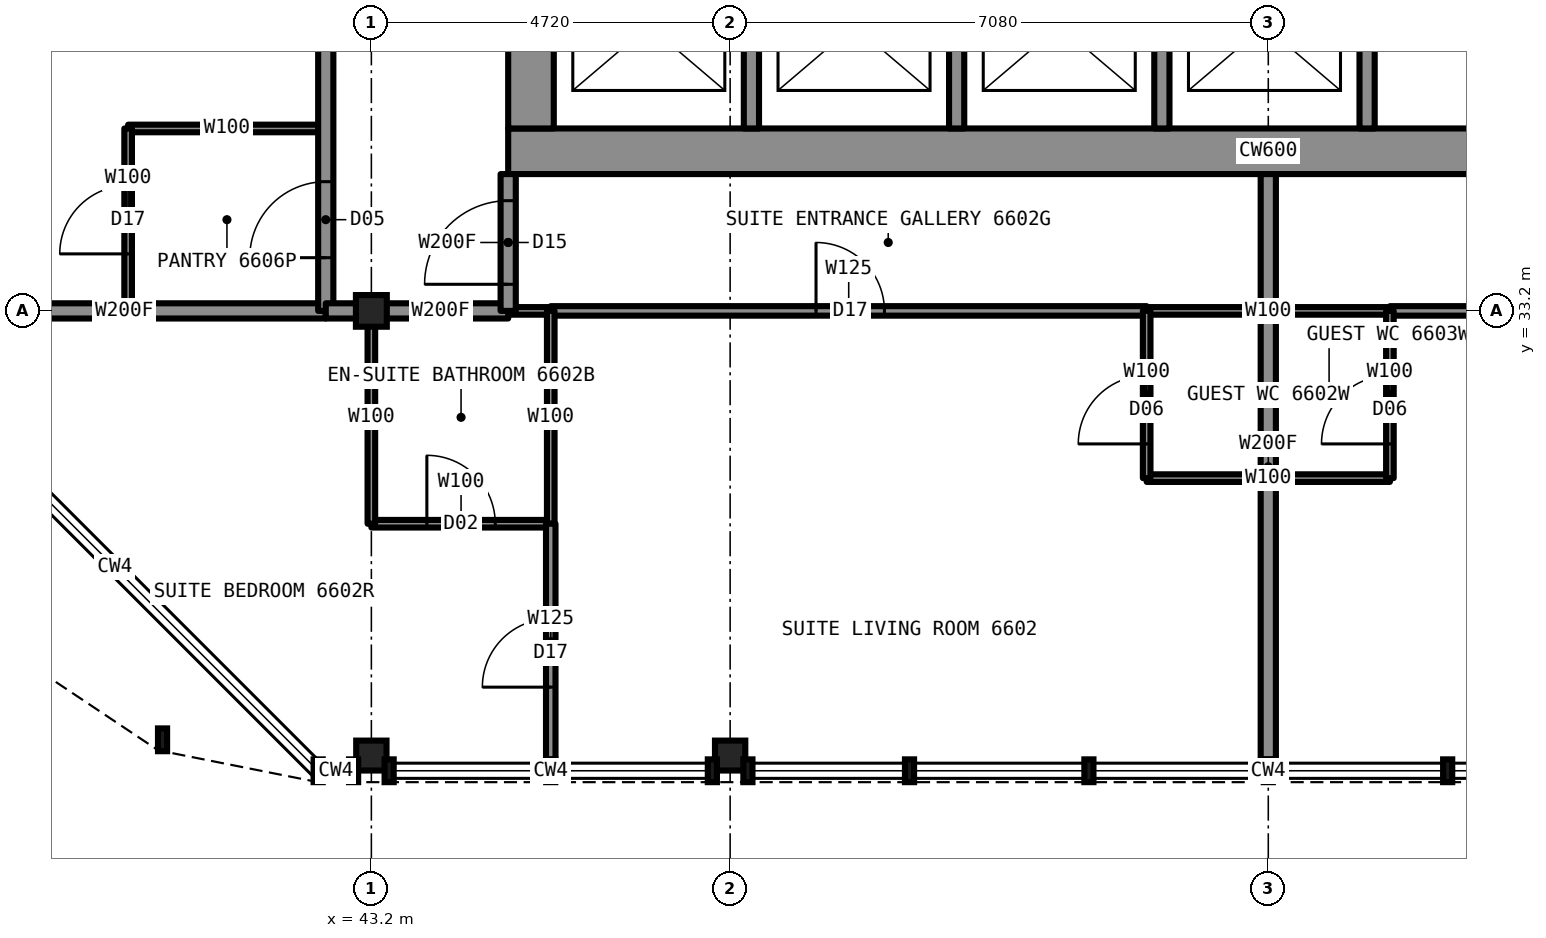
"""IFC4 building model, lengths in metres.
Left out: names, types, materials, properties, quantities, classifications, styles, units other than length and angle.
Written with IfcOpenShell. Run it as: python <this file> out.ifc"""

import sys

from ifc_helpers import new_model, si_unit, direction, frame, frame_2d, origin, origin_2d, place, context, subcontext, project, spatial, rectangle, i_section, extrude, element, fill, save


model = new_model("IFC4")
c1 = context("Model", 3, precision=1e-05, world=origin(), true_north=direction((0.0, 1.0)))
c2 = subcontext(c1, "Body", "Model", "MODEL_VIEW")
j1 = project(units=[si_unit("LENGTHUNIT", "METRE"), si_unit("PLANEANGLEUNIT", "RADIAN")], contexts=[c1])
p1 = place(None, origin())
s1 = spatial("IfcSite", under=j1, at=p1, CompositionType="ELEMENT")
p2 = place(p1, origin())
s2 = spatial("IfcBuilding", under=s1, at=p2, CompositionType="ELEMENT")
p3 = place(p2, frame((0.0, 0.0, 237.2)))
s3 = spatial("IfcBuildingStorey", under=s2, at=p3, CompositionType="ELEMENT", Elevation=237.2)
for number, where, z_axis, x_axis in (
    (1, (43.2, 27.35, 0.0), (0.0, 0.0, 1.0), (1.0, 0.0, 0.0)),
    (2, (47.92, 27.35, 0.0), (0.0, 0.0, 1.0), (1.0, 0.0, 0.0)),
):
    element("IfcColumn", number, at=place(p3, frame(where, z_axis=z_axis, x_axis=x_axis)), inside=s3, PredefinedType="COLUMN", context=c2, shape_type="SweptSolid", body=[
        extrude(i_section(OverallWidth=0.399, OverallDepth=0.394, WebThickness=0.023, FlangeThickness=0.037, at=origin_2d()), origin(), (0.0, 0.0, 1.0), 3.5),
    ])
p4 = place(p3, frame((43.2, 33.2, 0.0), z_axis=(0.0, 0.0, 1.0), x_axis=(1.0, 0.0, 0.0)))
e3 = element("IfcColumn", 3, at=p4, inside=s3, PredefinedType="COLUMN", context=c2, shape_type="SweptSolid", body=[
    extrude(i_section(OverallWidth=0.406, OverallDepth=0.417, WebThickness=0.03, FlangeThickness=0.048, at=origin_2d()), origin(), (0.0, 0.0, 1.0), 3.5),
])
p5 = place(p3, frame((45.0, 35.3, 0.0), z_axis=(0.0, 0.0, 1.0), x_axis=(1.0, 0.0, 0.0)))
e4 = element("IfcWall", 4, at=p5, inside=s3, PredefinedType="SHEAR", context=c2, shape_type="SweptSolid", body=[
    extrude(rectangle(XDim=20.0, YDim=0.6, at=frame_2d((10.0, 0.0))), origin(), (0.0, 0.0, 1.0), 3.5),
])
p6 = place(p3, frame((45.3, 35.6, 0.0), z_axis=(0.0, 0.0, 1.0), x_axis=(0.0, 1.0, 0.0)))
e5 = element("IfcWall", 5, at=p6, inside=s3, PredefinedType="SHEAR", context=c2, shape_type="SweptSolid", body=[
    extrude(rectangle(XDim=18.8, YDim=0.6, at=frame_2d((9.4, 0.0))), origin(), (0.0, 0.0, 1.0), 3.5),
])
p7 = place(p6, frame((13.4, 0.0, 0.0)))
e6 = element("IfcOpeningElement", 6, at=p7, cuts=e5, PredefinedType="OPENING", context=c2, shape_type="SweptSolid", body=[
    extrude(rectangle(XDim=1.8, YDim=2.2, at=frame_2d((0.9, 1.1))), frame((0.0, 0.31, 0.0), z_axis=(0.0, -1.0, 0.0), x_axis=(1.0, 0.0, 0.0)), (0.0, 0.0, 1.0), 0.62),
])
p8 = place(p6, frame((3.6, 0.0, 0.0)))
e7 = element("IfcOpeningElement", 7, at=p8, cuts=e5, PredefinedType="OPENING", context=c2, shape_type="SweptSolid", body=[
    extrude(rectangle(XDim=1.8, YDim=2.2, at=frame_2d((0.9, 1.1))), frame((0.0, 0.31, 0.0), z_axis=(0.0, -1.0, 0.0), x_axis=(1.0, 0.0, 0.0)), (0.0, 0.0, 1.0), 0.62),
])
p9 = place(p6, frame((6.4, 0.0, 0.0)))
e8 = element("IfcOpeningElement", 8, at=p9, cuts=e5, PredefinedType="OPENING", context=c2, shape_type="SweptSolid", body=[
    extrude(rectangle(XDim=1.2, YDim=2.2, at=frame_2d((0.6, 1.1))), frame((0.0, 0.31, 0.0), z_axis=(0.0, -1.0, 0.0), x_axis=(1.0, 0.0, 0.0)), (0.0, 0.0, 1.0), 0.62),
])
p10 = place(p3, frame((45.0, 33.2, 0.0), z_axis=(0.0, 0.0, 1.0), x_axis=(1.0, 0.0, 0.0)))
e9 = element("IfcWall", 9, at=p10, inside=s3, PredefinedType="PARTITIONING", context=c2, shape_type="SweptSolid", body=[
    extrude(rectangle(XDim=0.56, YDim=0.1, at=frame_2d((0.28, 0.0))), origin(), (0.0, 0.0, 1.0), 3.33),
])
p11 = place(p3, frame((53.4, 33.2, 0.0), z_axis=(0.0, 0.0, 1.0), x_axis=(1.0, 0.0, 0.0)))
e10 = element("IfcWall", 10, at=p11, inside=s3, PredefinedType="PARTITIONING", context=c2, shape_type="SweptSolid", body=[
    extrude(rectangle(XDim=3.2, YDim=0.1, at=frame_2d((1.6, 0.0))), origin(), (0.0, 0.0, 1.0), 3.33),
])
p12 = place(p3, frame((43.22, 33.2, 0.0), z_axis=(0.0, 0.0, 1.0), x_axis=(1.0, 0.0, 0.0)))
e11 = element("IfcWall", 11, at=p12, inside=s3, PredefinedType="PARTITIONING", context=c2, shape_type="SweptSolid", body=[
    extrude(rectangle(XDim=1.78, YDim=0.2, at=frame_2d((0.89, 0.0))), origin(), (0.0, 0.0, 1.0), 3.33),
])
p13 = place(p3, frame((37.3, 33.2, 0.0), z_axis=(0.0, 0.0, 1.0), x_axis=(1.0, 0.0, 0.0)))
e12 = element("IfcWall", 12, at=p13, inside=s3, PredefinedType="PARTITIONING", context=c2, shape_type="SweptSolid", body=[
    extrude(rectangle(XDim=5.3, YDim=0.2, at=frame_2d((2.65, 0.0))), origin(), (0.0, 0.0, 1.0), 2.573),
])
p14 = place(p3, frame((45.56, 33.2, 0.0), z_axis=(0.0, 0.0, 1.0), x_axis=(1.0, 0.0, 0.0)))
e13 = element("IfcWall", 13, at=p14, inside=s3, PredefinedType="PARTITIONING", context=c2, shape_type="SweptSolid", body=[
    extrude(rectangle(XDim=7.84, YDim=0.125, at=frame_2d((3.92, 0.0))), origin(), (0.0, 0.0, 1.0), 3.33),
])
p15 = place(p14, frame((3.49, 0.0, 0.0)))
e14 = element("IfcOpeningElement", 14, at=p15, cuts=e13, PredefinedType="OPENING", context=c2, shape_type="SweptSolid", body=[
    extrude(rectangle(XDim=0.9, YDim=2.2, at=frame_2d((0.45, 1.1))), frame((0.0, 0.073, 0.0), z_axis=(0.0, -1.0, 0.0), x_axis=(1.0, 0.0, 0.0)), (0.0, 0.0, 1.0), 0.145),
])
p16 = place(p3, frame((56.6, 33.2, 0.0), z_axis=(0.0, 0.0, 1.0), x_axis=(1.0, 0.0, 0.0)))
e15 = element("IfcWall", 15, at=p16, inside=s3, PredefinedType="PARTITIONING", context=c2, shape_type="SweptSolid", body=[
    extrude(rectangle(XDim=7.84, YDim=0.125, at=frame_2d((3.92, 0.0))), origin(), (0.0, 0.0, 1.0), 3.33),
])
p17 = place(p16, frame((3.45, 0.0, 0.0)))
e16 = element("IfcOpeningElement", 16, at=p17, cuts=e15, PredefinedType="OPENING", context=c2, shape_type="SweptSolid", body=[
    extrude(rectangle(XDim=0.9, YDim=2.2, at=frame_2d((0.45, 1.1))), frame((0.0, 0.073, 0.0), z_axis=(0.0, -1.0, 0.0), x_axis=(1.0, 0.0, 0.0)), (0.0, 0.0, 1.0), 0.145),
])
p18 = place(p3, frame((53.4, 31.0, 0.0), z_axis=(0.0, 0.0, 1.0), x_axis=(1.0, 0.0, 0.0)))
e17 = element("IfcWall", 17, at=p18, inside=s3, PredefinedType="PARTITIONING", context=c2, shape_type="SweptSolid", body=[
    extrude(rectangle(XDim=3.2, YDim=0.1, at=frame_2d((1.6, 0.0))), origin(), (0.0, 0.0, 1.0), 3.33),
])
p19 = place(p3, frame((43.2, 30.4, 0.0), z_axis=(0.0, 0.0, 1.0), x_axis=(1.0, 0.0, 0.0)))
e18 = element("IfcWall", 18, at=p19, inside=s3, PredefinedType="PARTITIONING", context=c2, shape_type="SweptSolid", body=[
    extrude(rectangle(XDim=2.36, YDim=0.1, at=frame_2d((1.18, 0.0))), origin(), (0.0, 0.0, 1.0), 3.33),
])
p20 = place(p19, frame((0.73, 0.0, 0.0)))
e19 = element("IfcOpeningElement", 19, at=p20, cuts=e18, PredefinedType="OPENING", context=c2, shape_type="SweptSolid", body=[
    extrude(rectangle(XDim=0.9, YDim=2.1, at=frame_2d((0.45, 1.05))), frame((0.0, 0.06, 0.0), z_axis=(0.0, -1.0, 0.0), x_axis=(1.0, 0.0, 0.0)), (0.0, 0.0, 1.0), 0.12),
])
p21 = place(p3, frame((40.0, 35.6, 0.0), z_axis=(0.0, 0.0, 1.0), x_axis=(1.0, 0.0, 0.0)))
e20 = element("IfcWall", 20, at=p21, inside=s3, PredefinedType="PARTITIONING", context=c2, shape_type="SweptSolid", body=[
    extrude(rectangle(XDim=2.6, YDim=0.1, at=frame_2d((1.3, 0.0))), origin(), (0.0, 0.0, 1.0), 2.797),
])
p22 = place(p3, frame((53.4, 31.0, 0.0), z_axis=(0.0, 0.0, 1.0), x_axis=(0.0, 1.0, 0.0)))
e21 = element("IfcWall", 21, at=p22, inside=s3, PredefinedType="PARTITIONING", context=c2, shape_type="SweptSolid", body=[
    extrude(rectangle(XDim=2.2, YDim=0.1, at=frame_2d((1.1, 0.0))), origin(), (0.0, 0.0, 1.0), 3.33),
])
p23 = place(p22, frame((0.45, 0.0, 0.0)))
e22 = element("IfcOpeningElement", 22, at=p23, cuts=e21, PredefinedType="OPENING", context=c2, shape_type="SweptSolid", body=[
    extrude(rectangle(XDim=0.9, YDim=2.1, at=frame_2d((0.45, 1.05))), frame((0.0, 0.06, 0.0), z_axis=(0.0, -1.0, 0.0), x_axis=(1.0, 0.0, 0.0)), (0.0, 0.0, 1.0), 0.12),
])
p24 = place(p3, frame((45.0, 33.2, 0.0), z_axis=(0.0, 0.0, 1.0), x_axis=(0.0, 1.0, 0.0)))
e23 = element("IfcWall", 23, at=p24, inside=s3, PredefinedType="PARTITIONING", context=c2, shape_type="SweptSolid", body=[
    extrude(rectangle(XDim=1.8, YDim=0.2, at=frame_2d((0.9, 0.0))), origin(), (0.0, 0.0, 1.0), 3.33),
])
p25 = place(p24, frame((0.35, 0.0, 0.0)))
e24 = element("IfcOpeningElement", 24, at=p25, cuts=e23, PredefinedType="OPENING", context=c2, shape_type="SweptSolid", body=[
    extrude(rectangle(XDim=1.1, YDim=2.2, at=frame_2d((0.55, 1.1))), frame((0.0, 0.11, 0.0), z_axis=(0.0, -1.0, 0.0), x_axis=(1.0, 0.0, 0.0)), (0.0, 0.0, 1.0), 0.22),
])
p26 = place(p3, frame((43.2, 30.4, 0.0), z_axis=(0.0, 0.0, 1.0), x_axis=(0.0, 1.0, 0.0)))
e25 = element("IfcWall", 25, at=p26, inside=s3, PredefinedType="PARTITIONING", context=c2, shape_type="SweptSolid", body=[
    extrude(rectangle(XDim=2.8, YDim=0.1, at=frame_2d((1.4, 0.0))), origin(), (0.0, 0.0, 1.0), 2.573),
])
p27 = place(p3, frame((42.6, 33.2, 0.0), z_axis=(0.0, 0.0, 1.0), x_axis=(0.0, 1.0, 0.0)))
e26 = element("IfcWall", 26, at=p27, inside=s3, PredefinedType="PARTITIONING", context=c2, shape_type="SweptSolid", body=[
    extrude(rectangle(XDim=23.6, YDim=0.2, at=frame_2d((11.8, 0.0))), origin(), (0.0, 0.0, 1.0), 3.33),
])
p28 = place(p27, frame((8.95, 0.0, 0.0)))
e27 = element("IfcOpeningElement", 27, at=p28, cuts=e26, PredefinedType="OPENING", context=c2, shape_type="SweptSolid", body=[
    extrude(rectangle(XDim=1.1, YDim=2.2, at=frame_2d((0.55, 1.1))), frame((0.0, 0.11, 0.0), z_axis=(0.0, -1.0, 0.0), x_axis=(1.0, 0.0, 0.0)), (0.0, 0.0, 1.0), 0.22),
])
p29 = place(p27, frame((0.7, 0.0, 0.0)))
e28 = element("IfcOpeningElement", 28, at=p29, cuts=e26, PredefinedType="OPENING", context=c2, shape_type="SweptSolid", body=[
    extrude(rectangle(XDim=1.0, YDim=2.1, at=frame_2d((0.5, 1.05))), frame((0.0, 0.11, 0.0), z_axis=(0.0, -1.0, 0.0), x_axis=(1.0, 0.0, 0.0)), (0.0, 0.0, 1.0), 0.22),
])
p30 = place(p3, frame((40.0, 33.2, 0.0), z_axis=(0.0, 0.0, 1.0), x_axis=(0.0, 1.0, 0.0)))
e29 = element("IfcWall", 29, at=p30, inside=s3, PredefinedType="PARTITIONING", context=c2, shape_type="SweptSolid", body=[
    extrude(rectangle(XDim=2.4, YDim=0.1, at=frame_2d((1.2, 0.0))), origin(), (0.0, 0.0, 1.0), 3.33),
])
p31 = place(p30, frame((0.75, 0.0, 0.0)))
e30 = element("IfcOpeningElement", 30, at=p31, cuts=e29, PredefinedType="OPENING", context=c2, shape_type="SweptSolid", body=[
    extrude(rectangle(XDim=0.9, YDim=2.2, at=frame_2d((0.45, 1.1))), frame((0.0, 0.06, 0.0), z_axis=(0.0, -1.0, 0.0), x_axis=(1.0, 0.0, 0.0)), (0.0, 0.0, 1.0), 0.12),
])
p32 = place(p3, frame((45.56, 30.4, 0.0), z_axis=(0.0, 0.0, 1.0), x_axis=(0.0, 1.0, 0.0)))
e31 = element("IfcWall", 31, at=p32, inside=s3, PredefinedType="PARTITIONING", context=c2, shape_type="SweptSolid", body=[
    extrude(rectangle(XDim=2.8, YDim=0.1, at=frame_2d((1.4, 0.0))), origin(), (0.0, 0.0, 1.0), 3.33),
])
p33 = place(p3, frame((45.56, 27.3, 0.0), z_axis=(0.0, 0.0, 1.0), x_axis=(0.0, 1.0, 0.0)))
e32 = element("IfcWall", 32, at=p33, inside=s3, PredefinedType="PARTITIONING", context=c2, shape_type="SweptSolid", body=[
    extrude(rectangle(XDim=3.1, YDim=0.125, at=frame_2d((1.55, 0.0))), origin(), (0.0, 0.0, 1.0), 3.33),
])
p34 = place(p33, frame((0.95, 0.0, 0.0)))
e33 = element("IfcOpeningElement", 33, at=p34, cuts=e32, PredefinedType="OPENING", context=c2, shape_type="SweptSolid", body=[
    extrude(rectangle(XDim=0.9, YDim=2.2, at=frame_2d((0.45, 1.1))), frame((0.0, 0.073, 0.0), z_axis=(0.0, -1.0, 0.0), x_axis=(1.0, 0.0, 0.0)), (0.0, 0.0, 1.0), 0.145),
])
p35 = place(p3, frame((55.0, 27.3, 0.0), z_axis=(0.0, 0.0, 1.0), x_axis=(0.0, 1.0, 0.0)))
e34 = element("IfcWall", 34, at=p35, inside=s3, PredefinedType="PARTITIONING", context=c2, shape_type="SweptSolid", body=[
    extrude(rectangle(XDim=7.7, YDim=0.2, at=frame_2d((3.85, 0.0))), origin(), (0.0, 0.0, 1.0), 2.573),
])
p36 = place(p3, frame((56.6, 31.0, 0.0), z_axis=(0.0, 0.0, 1.0), x_axis=(0.0, 1.0, 0.0)))
e35 = element("IfcWall", 35, at=p36, inside=s3, PredefinedType="PARTITIONING", context=c2, shape_type="SweptSolid", body=[
    extrude(rectangle(XDim=2.2, YDim=0.1, at=frame_2d((1.1, 0.0))), origin(), (0.0, 0.0, 1.0), 3.33),
])
p37 = place(p36, frame((0.45, 0.0, 0.0)))
e36 = element("IfcOpeningElement", 36, at=p37, cuts=e35, PredefinedType="OPENING", context=c2, shape_type="SweptSolid", body=[
    extrude(rectangle(XDim=0.9, YDim=2.1, at=frame_2d((0.45, 1.05))), frame((0.0, 0.06, 0.0), z_axis=(0.0, -1.0, 0.0), x_axis=(1.0, 0.0, 0.0)), (0.0, 0.0, 1.0), 0.12),
])
for number, where, z_axis, x_axis in (
    (37, (48.2, 35.6, 0.0), (0.0, 0.0, 1.0), (0.0, 1.0, 0.0)),
    (38, (50.9, 35.6, 0.0), (0.0, 0.0, 1.0), (0.0, 1.0, 0.0)),
    (39, (53.6, 35.6, 0.0), (0.0, 0.0, 1.0), (0.0, 1.0, 0.0)),
    (40, (56.3, 35.6, 0.0), (0.0, 0.0, 1.0), (0.0, 1.0, 0.0)),
):
    element("IfcWall", number, at=place(p3, frame(where, z_axis=z_axis, x_axis=x_axis)), inside=s3, PredefinedType="PARTITIONING", context=c2, shape_type="SweptSolid", body=[
        extrude(rectangle(XDim=2.7, YDim=0.2, at=frame_2d((1.35, 0.0))), origin(), (0.0, 0.0, 1.0), 3.33),
    ])
p38 = place(p3, frame((42.6, 33.2, 0.0), z_axis=(0.0, 0.0, 1.0), x_axis=(1.0, 0.0, 0.0)))
e41 = element("IfcWall", 41, at=p38, inside=s3, PredefinedType="PARTITIONING", context=c2, shape_type="SweptSolid", body=[
    extrude(rectangle(XDim=0.62, YDim=0.2, at=frame_2d((0.31, 0.0))), origin(), (0.0, 0.0, 1.0), 2.573),
])
p39 = place(p15, origin())
e42 = element("IfcDoor", 42, at=p39, inside=s3, OperationType="SINGLE_SWING_LEFT", PredefinedType="DOOR", context=c2, shape_type="SweptSolid", body=[
    extrude(rectangle(XDim=0.9, YDim=2.2, at=frame_2d((0.45, 1.1))), frame((0.0, 0.025, 0.0), z_axis=(0.0, -1.0, 0.0), x_axis=(1.0, 0.0, 0.0)), (0.0, 0.0, 1.0), 0.05),
])
fill(e14, e42)
p40 = place(p20, origin())
e43 = element("IfcDoor", 43, at=p40, inside=s3, OperationType="SINGLE_SWING_RIGHT", PredefinedType="DOOR", context=c2, shape_type="SweptSolid", body=[
    extrude(rectangle(XDim=0.9, YDim=2.1, at=frame_2d((0.45, 1.05))), frame((0.0, 0.025, 0.0), z_axis=(0.0, -1.0, 0.0), x_axis=(1.0, 0.0, 0.0)), (0.0, 0.0, 1.0), 0.05),
])
fill(e19, e43)
p41 = place(p25, origin())
e44 = element("IfcDoor", 44, at=p41, inside=s3, OperationType="SINGLE_SWING_LEFT", PredefinedType="DOOR", context=c2, shape_type="SweptSolid", body=[
    extrude(rectangle(XDim=1.1, YDim=2.2, at=frame_2d((0.55, 1.1))), frame((0.0, 0.025, 0.0), z_axis=(0.0, -1.0, 0.0), x_axis=(1.0, 0.0, 0.0)), (0.0, 0.0, 1.0), 0.05),
])
fill(e24, e44)
p42 = place(p34, origin())
e45 = element("IfcDoor", 45, at=p42, inside=s3, OperationType="SINGLE_SWING_LEFT", PredefinedType="DOOR", context=c2, shape_type="SweptSolid", body=[
    extrude(rectangle(XDim=0.9, YDim=2.2, at=frame_2d((0.45, 1.1))), frame((0.0, 0.025, 0.0), z_axis=(0.0, -1.0, 0.0), x_axis=(1.0, 0.0, 0.0)), (0.0, 0.0, 1.0), 0.05),
])
fill(e33, e45)
p43 = place(p23, origin())
e46 = element("IfcDoor", 46, at=p43, inside=s3, OperationType="SINGLE_SWING_LEFT", PredefinedType="DOOR", context=c2, shape_type="SweptSolid", body=[
    extrude(rectangle(XDim=0.9, YDim=2.1, at=frame_2d((0.45, 1.05))), frame((0.0, 0.025, 0.0), z_axis=(0.0, -1.0, 0.0), x_axis=(1.0, 0.0, 0.0)), (0.0, 0.0, 1.0), 0.05),
])
fill(e22, e46)
p44 = place(p37, origin())
e47 = element("IfcDoor", 47, at=p44, inside=s3, OperationType="SINGLE_SWING_LEFT", PredefinedType="DOOR", context=c2, shape_type="SweptSolid", body=[
    extrude(rectangle(XDim=0.9, YDim=2.1, at=frame_2d((0.45, 1.05))), frame((0.0, 0.025, 0.0), z_axis=(0.0, -1.0, 0.0), x_axis=(1.0, 0.0, 0.0)), (0.0, 0.0, 1.0), 0.05),
])
fill(e36, e47)
p45 = place(p31, origin())
e48 = element("IfcDoor", 48, at=p45, inside=s3, OperationType="SINGLE_SWING_LEFT", PredefinedType="DOOR", context=c2, shape_type="SweptSolid", body=[
    extrude(rectangle(XDim=0.9, YDim=2.2, at=frame_2d((0.45, 1.1))), frame((0.0, 0.025, 0.0), z_axis=(0.0, -1.0, 0.0), x_axis=(1.0, 0.0, 0.0)), (0.0, 0.0, 1.0), 0.05),
])
fill(e30, e48)
p46 = place(p29, origin())
e49 = element("IfcDoor", 49, at=p46, inside=s3, OperationType="SINGLE_SWING_LEFT", PredefinedType="DOOR", context=c2, shape_type="SweptSolid", body=[
    extrude(rectangle(XDim=1.0, YDim=2.1, at=frame_2d((0.5, 1.05))), frame((0.0, 0.025, 0.0), z_axis=(0.0, -1.0, 0.0), x_axis=(1.0, 0.0, 0.0)), (0.0, 0.0, 1.0), 0.05),
])
fill(e28, e49)
save(model, sys.argv[1])
